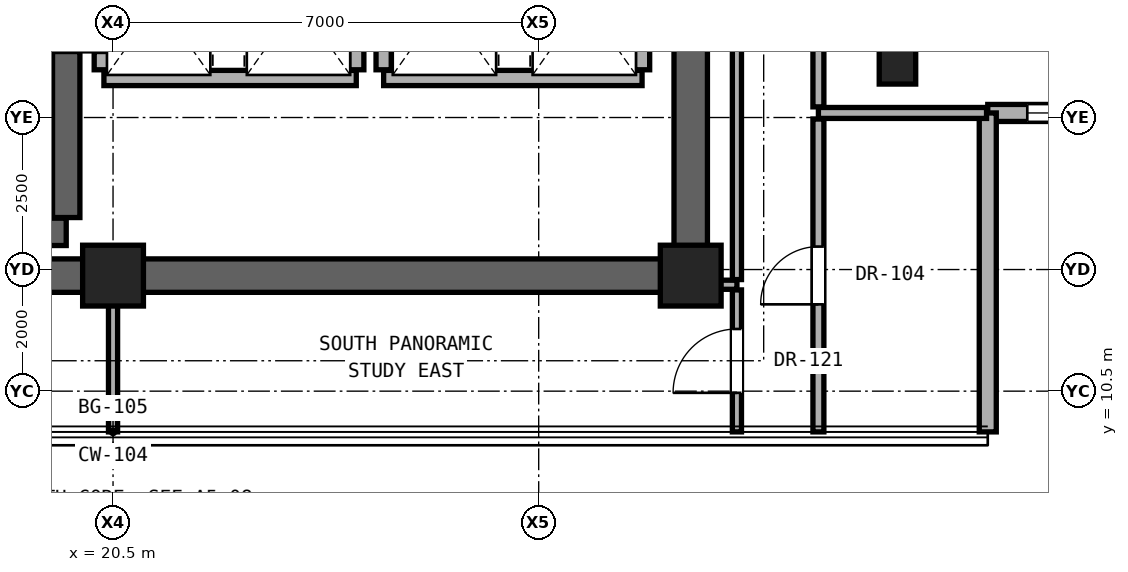
"""IFC4 building model, lengths in metres.
Left out: names, types, materials, properties, quantities, classifications, styles, units other than length and angle.
Written with IfcOpenShell. Run it as: python <this file> out.ifc"""

import sys

from ifc_helpers import new_model, si_unit, direction, frame, frame_2d, origin, origin_2d, place, context, subcontext, project, spatial, rectangle, extrude, element, fill, save


model = new_model("IFC4")
c1 = context("Model", 3, precision=1e-05, world=origin(), true_north=direction((0.0, 1.0)))
c2 = subcontext(c1, "Body", "Model", "MODEL_VIEW")
j1 = project(units=[si_unit("LENGTHUNIT", "METRE"), si_unit("PLANEANGLEUNIT", "RADIAN")], contexts=[c1])
p1 = place(None, origin())
s1 = spatial("IfcSite", under=j1, at=p1, CompositionType="ELEMENT")
p2 = place(p1, origin())
s2 = spatial("IfcBuilding", under=s1, at=p2, CompositionType="ELEMENT")
p3 = place(p2, frame((0.0, 0.0, 154.4)))
s3 = spatial("IfcBuildingStorey", under=s2, at=p3, CompositionType="ELEMENT", Elevation=154.4)
for number, where, z_axis, x_axis in (
    (1, (20.5, 12.4, 0.0), (0.0, 0.0, 1.0), (1.0, 0.0, 0.0)),
    (2, (30.0, 12.4, 0.0), (0.0, 0.0, 1.0), (1.0, 0.0, 0.0)),
):
    element("IfcColumn", number, at=place(p3, frame(where, z_axis=z_axis, x_axis=x_axis)), inside=s3, PredefinedType="COLUMN", context=c2, shape_type="SweptSolid", body=[
        extrude(rectangle(XDim=1.0, YDim=1.0, at=origin_2d()), origin(), (0.0, 0.0, 1.0), 3.25),
    ])
p4 = place(p3, frame((33.4, 16.0, 0.0), z_axis=(0.0, 0.0, 1.0), x_axis=(1.0, 0.0, 0.0)))
e3 = element("IfcColumn", 3, at=p4, inside=s3, PredefinedType="PILASTER", context=c2, shape_type="SweptSolid", body=[
    extrude(rectangle(XDim=0.6, YDim=0.9, at=origin_2d()), origin(), (0.0, 0.0, 1.0), 3.25),
])
p5 = place(p3, frame((11.0, 12.4, 0.0), z_axis=(0.0, 0.0, 1.0), x_axis=(1.0, 0.0, 0.0)))
e4 = element("IfcWall", 4, at=p5, inside=s3, PredefinedType="SHEAR", context=c2, shape_type="SweptSolid", body=[
    extrude(rectangle(XDim=19.0, YDim=0.55, at=frame_2d((9.5, 0.0))), origin(), (0.0, 0.0, 1.0), 3.05),
])
p6 = place(p3, frame((30.0, 12.4, 0.0), z_axis=(0.0, 0.0, 1.0), x_axis=(0.0, 1.0, 0.0)))
e5 = element("IfcWall", 5, at=p6, inside=s3, PredefinedType="SHEAR", context=c2, shape_type="SweptSolid", body=[
    extrude(rectangle(XDim=6.0, YDim=0.55, at=frame_2d((3.0, 0.0))), origin(), (0.0, 0.0, 1.0), 3.05),
])
p7 = place(p3, frame((34.885, 15.075, 0.0), z_axis=(0.0, 0.0, 1.0), x_axis=(1.0, 0.0, 0.0)))
e6 = element("IfcWall", 6, at=p7, inside=s3, PredefinedType="SOLIDWALL", context=c2, shape_type="SweptSolid", body=[
    extrude(rectangle(XDim=5.245, YDim=0.28, at=frame_2d((2.623, 0.0))), origin(), (0.0, 0.0, 1.0), 3.03),
])
p8 = place(p7, frame((0.65, 0.0, 0.85)))
e7 = element("IfcOpeningElement", 7, at=p8, cuts=e6, PredefinedType="OPENING", context=c2, shape_type="SweptSolid", body=[
    extrude(rectangle(XDim=1.1, YDim=2.0, at=frame_2d((0.55, 1.0))), frame((0.0, 0.15, 0.0), z_axis=(0.0, -1.0, 0.0), x_axis=(1.0, 0.0, 0.0)), (0.0, 0.0, 1.0), 0.3),
])
p9 = place(p3, frame((34.885, 9.83, 0.0), z_axis=(0.0, 0.0, 1.0), x_axis=(0.0, 1.0, 0.0)))
e8 = element("IfcWall", 8, at=p9, inside=s3, PredefinedType="SOLIDWALL", context=c2, shape_type="SweptSolid", body=[
    extrude(rectangle(XDim=5.245, YDim=0.28, at=frame_2d((2.623, 0.0))), origin(), (0.0, 0.0, 1.0), 3.03),
])
p10 = place(p3, frame((30.27, 12.25, 0.0), z_axis=(0.0, 0.0, 1.0), x_axis=(1.0, 0.0, 0.0)))
e9 = element("IfcWall", 9, at=p10, inside=s3, PredefinedType="PARTITIONING", context=c2, shape_type="SweptSolid", body=[
    extrude(rectangle(XDim=0.49, YDim=0.15, at=frame_2d((0.245, 0.0))), origin(), (0.0, 0.0, 1.0), 3.05),
])
p11 = place(p3, frame((11.27, 13.12, 0.0), z_axis=(0.0, 0.0, 1.0), x_axis=(1.0, 0.0, 0.0)))
e10 = element("IfcWall", 10, at=p11, inside=s3, PredefinedType="SHEAR", context=c2, shape_type="SweptSolid", body=[
    extrude(rectangle(XDim=8.46, YDim=0.45, at=frame_2d((4.23, 0.0))), origin(), (0.0, 0.0, 1.0), 3.05),
])
p12 = place(p3, frame((32.1, 15.075, 0.0), z_axis=(0.0, 0.0, 1.0), x_axis=(1.0, 0.0, 0.0)))
e11 = element("IfcWall", 11, at=p12, inside=s3, PredefinedType="PARTITIONING", context=c2, shape_type="SweptSolid", body=[
    extrude(rectangle(XDim=2.765, YDim=0.18, at=frame_2d((1.382, 0.0))), origin(), (0.0, 0.0, 1.0), 3.05),
])
p13 = place(p3, frame((20.35, 15.65, 0.0), z_axis=(0.0, 0.0, 1.0), x_axis=(1.0, 0.0, 0.0)))
e12 = element("IfcWall", 12, at=p13, inside=s3, PredefinedType="SOLIDWALL", context=c2, shape_type="SweptSolid", body=[
    extrude(rectangle(XDim=4.15, YDim=0.25, at=frame_2d((2.075, 0.0))), origin(), (0.0, 0.0, 1.0), 3.05),
])
p14 = place(p3, frame((24.95, 15.65, 0.0), z_axis=(0.0, 0.0, 1.0), x_axis=(1.0, 0.0, 0.0)))
e13 = element("IfcWall", 13, at=p14, inside=s3, PredefinedType="SOLIDWALL", context=c2, shape_type="SweptSolid", body=[
    extrude(rectangle(XDim=4.25, YDim=0.25, at=frame_2d((2.125, 0.0))), origin(), (0.0, 0.0, 1.0), 3.05),
])
p15 = place(p3, frame((19.73, 13.355, 0.0), z_axis=(0.0, 0.0, 1.0), x_axis=(0.0, 1.0, 0.0)))
e14 = element("IfcWall", 14, at=p15, inside=s3, PredefinedType="SHEAR", context=c2, shape_type="SweptSolid", body=[
    extrude(rectangle(XDim=2.73, YDim=0.45, at=frame_2d((1.365, 0.0))), origin(), (0.0, 0.0, 1.0), 3.05),
])
p16 = place(p3, frame((20.315, 15.785, 0.0), z_axis=(0.0, 0.0, 1.0), x_axis=(0.0, 1.0, 0.0)))
e15 = element("IfcWall", 15, at=p16, inside=s3, PredefinedType="SOLIDWALL", context=c2, shape_type="SweptSolid", body=[
    extrude(rectangle(XDim=0.3, YDim=0.25, at=frame_2d((0.15, 0.0))), origin(), (0.0, 0.0, 1.0), 3.05),
])
p17 = place(p3, frame((20.5, 9.83, 0.0), z_axis=(0.0, 0.0, 1.0), x_axis=(0.0, 1.0, 0.0)))
e16 = element("IfcWall", 16, at=p17, inside=s3, PredefinedType="PARTITIONING", context=c2, shape_type="SweptSolid", body=[
    extrude(rectangle(XDim=2.3, YDim=0.15, at=frame_2d((1.15, 0.0))), origin(), (0.0, 0.0, 1.0), 3.05),
])
for number, where, z_axis, x_axis in (
    (17, (24.5, 15.785, 0.0), (0.0, 0.0, 1.0), (0.0, 1.0, 0.0)),
    (18, (24.95, 15.785, 0.0), (0.0, 0.0, 1.0), (0.0, 1.0, 0.0)),
    (19, (29.2, 15.785, 0.0), (0.0, 0.0, 1.0), (0.0, 1.0, 0.0)),
):
    element("IfcWall", number, at=place(p3, frame(where, z_axis=z_axis, x_axis=x_axis)), inside=s3, PredefinedType="SOLIDWALL", context=c2, shape_type="SweptSolid", body=[
        extrude(rectangle(XDim=2.345, YDim=0.25, at=frame_2d((1.172, 0.0))), origin(), (0.0, 0.0, 1.0), 3.05),
    ])
p18 = place(p3, frame((30.76, 9.83, 0.0), z_axis=(0.0, 0.0, 1.0), x_axis=(0.0, 1.0, 0.0)))
e20 = element("IfcWall", 20, at=p18, inside=s3, PredefinedType="PARTITIONING", context=c2, shape_type="SweptSolid", body=[
    extrude(rectangle(XDim=2.335, YDim=0.15, at=frame_2d((1.167, 0.0))), origin(), (0.0, 0.0, 1.0), 3.05),
])
p19 = place(p18, frame((0.643, 0.0, 0.0)))
e21 = element("IfcOpeningElement", 21, at=p19, cuts=e20, PredefinedType="OPENING", context=c2, shape_type="SweptSolid", body=[
    extrude(rectangle(XDim=1.05, YDim=2.2, at=frame_2d((0.525, 1.1))), frame((0.0, 0.085, 0.0), z_axis=(0.0, -1.0, 0.0), x_axis=(1.0, 0.0, 0.0)), (0.0, 0.0, 1.0), 0.17),
])
p20 = place(p3, frame((30.76, 12.335, 0.0), z_axis=(0.0, 0.0, 1.0), x_axis=(0.0, 1.0, 0.0)))
e22 = element("IfcWall", 22, at=p20, inside=s3, PredefinedType="PARTITIONING", context=c2, shape_type="SweptSolid", body=[
    extrude(rectangle(XDim=5.98, YDim=0.15, at=frame_2d((2.99, 0.0))), origin(), (0.0, 0.0, 1.0), 2.442),
])
p21 = place(p3, frame((32.1, 9.83, 0.0), z_axis=(0.0, 0.0, 1.0), x_axis=(0.0, 1.0, 0.0)))
e23 = element("IfcWall", 23, at=p21, inside=s3, PredefinedType="PARTITIONING", context=c2, shape_type="SweptSolid", body=[
    extrude(rectangle(XDim=5.145, YDim=0.18, at=frame_2d((2.573, 0.0))), origin(), (0.0, 0.0, 1.0), 3.05),
])
p22 = place(p21, frame((2.097, 0.0, 0.0)))
e24 = element("IfcOpeningElement", 24, at=p22, cuts=e23, PredefinedType="OPENING", context=c2, shape_type="SweptSolid", body=[
    extrude(rectangle(XDim=0.95, YDim=2.15, at=frame_2d((0.475, 1.075))), frame((0.0, 0.1, 0.0), z_axis=(0.0, -1.0, 0.0), x_axis=(1.0, 0.0, 0.0)), (0.0, 0.0, 1.0), 0.2),
])
p23 = place(p3, frame((32.1, 15.175, 0.0), z_axis=(0.0, 0.0, 1.0), x_axis=(0.0, 1.0, 0.0)))
e25 = element("IfcWall", 25, at=p23, inside=s3, PredefinedType="PARTITIONING", context=c2, shape_type="SweptSolid", body=[
    extrude(rectangle(XDim=7.225, YDim=0.18, at=frame_2d((3.612, 0.0))), origin(), (0.0, 0.0, 1.0), 2.442),
])
p24 = place(p23, frame((3.087, 0.0, 0.0)))
e26 = element("IfcOpeningElement", 26, at=p24, cuts=e25, PredefinedType="OPENING", context=c2, shape_type="SweptSolid", body=[
    extrude(rectangle(XDim=1.05, YDim=2.2, at=frame_2d((0.525, 1.1))), frame((0.0, 0.1, 0.0), z_axis=(0.0, -1.0, 0.0), x_axis=(1.0, 0.0, 0.0)), (0.0, 0.0, 1.0), 0.2),
])
p25 = place(p8, origin())
e27 = element("IfcWindow", 27, at=p25, inside=s3, PartitioningType="SINGLE_PANEL", PredefinedType="WINDOW", context=c2, shape_type="SweptSolid", body=[
    extrude(rectangle(XDim=1.1, YDim=2.0, at=frame_2d((0.55, 1.0))), frame((0.0, 0.03, 0.0), z_axis=(0.0, -1.0, 0.0), x_axis=(1.0, 0.0, 0.0)), (0.0, 0.0, 1.0), 0.06),
])
fill(e7, e27)
p26 = place(p19, origin())
e28 = element("IfcDoor", 28, at=p26, inside=s3, OperationType="SINGLE_SWING_LEFT", PredefinedType="DOOR", context=c2, shape_type="SweptSolid", body=[
    extrude(rectangle(XDim=1.05, YDim=2.2, at=frame_2d((0.525, 1.1))), frame((0.0, 0.025, 0.0), z_axis=(0.0, -1.0, 0.0), x_axis=(1.0, 0.0, 0.0)), (0.0, 0.0, 1.0), 0.05),
])
fill(e21, e28)
p27 = place(p22, origin())
e29 = element("IfcDoor", 29, at=p27, inside=s3, OperationType="SINGLE_SWING_LEFT", PredefinedType="DOOR", context=c2, shape_type="SweptSolid", body=[
    extrude(rectangle(XDim=0.95, YDim=2.15, at=frame_2d((0.475, 1.075))), frame((0.0, 0.025, 0.0), z_axis=(0.0, -1.0, 0.0), x_axis=(1.0, 0.0, 0.0)), (0.0, 0.0, 1.0), 0.05),
])
fill(e24, e29)
save(model, sys.argv[1])
